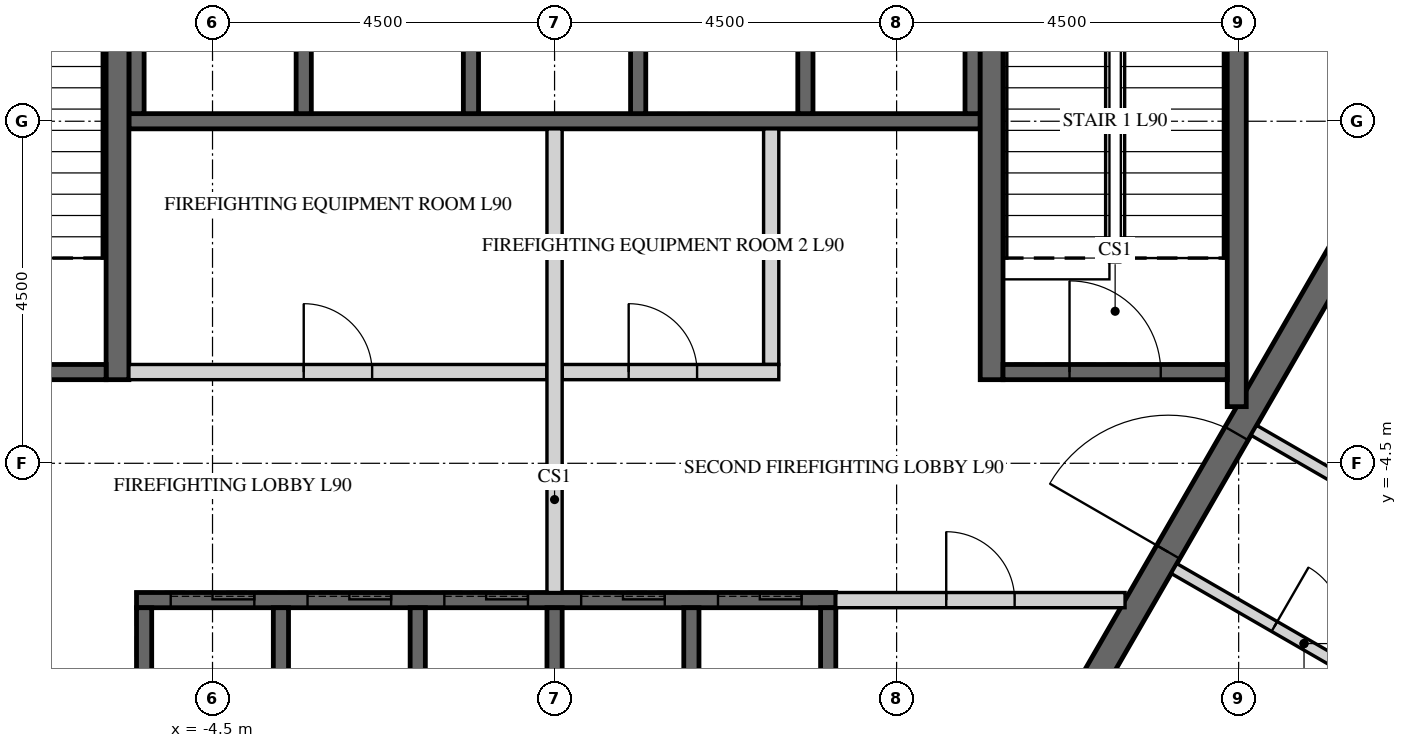
"""IFC4 building model, lengths in metres.
Left out: names, types, materials, properties, quantities, classifications, styles, units other than length and angle.
Written with IfcOpenShell. Run it as: python <this file> out.ifc"""

import sys

from ifc_helpers import new_model, si_unit, direction, frame, frame_2d, origin, place, context, subcontext, project, spatial, polyline, rectangle, outline, extrude, element, fill, save


model = new_model("IFC4")
c1 = context("Model", 3, precision=1e-05, world=origin(), true_north=direction((0.0, 1.0)))
c2 = subcontext(c1, "Body", "Model", "MODEL_VIEW")
j1 = project(units=[si_unit("LENGTHUNIT", "METRE"), si_unit("PLANEANGLEUNIT", "RADIAN")], contexts=[c1])
p1 = place(None, origin())
s1 = spatial("IfcSite", under=j1, at=p1, CompositionType="ELEMENT")
p2 = place(p1, origin())
s2 = spatial("IfcBuilding", under=s1, at=p2, CompositionType="ELEMENT")
p3 = place(p2, frame((0.0, 0.0, 372.9)))
s3 = spatial("IfcBuildingStorey", under=s2, at=p3, CompositionType="ELEMENT", Elevation=372.9)
p4 = place(p3, frame((-5.673, 9.825, -0.15), z_axis=(0.0, 0.0, 1.0), x_axis=(-0.499995046907, -0.866028263435, 0.0)))
e1 = element("IfcWall", 1, at=p4, inside=s3, PredefinedType="SHEAR", context=c2, shape_type="SweptSolid", body=[
    extrude(outline(polyline([(-0.101, -0.175), (11.446, -0.175), (11.244, 0.175), (0.101, 0.175), (-0.101, -0.175)])), origin(), (0.0, 0.0, 1.0), 3.55),
])
p5 = place(p4, frame((4.801, 0.0, 0.15)))
e2 = element("IfcOpeningElement", 2, at=p5, cuts=e1, PredefinedType="OPENING", context=c2, shape_type="SweptSolid", body=[
    extrude(rectangle(XDim=1.8, YDim=2.4, at=frame_2d((0.9, 1.2))), frame((0.0, 0.185, 0.0), z_axis=(0.0, -1.0, 0.0), x_axis=(1.0, 0.0, 0.0)), (0.0, 0.0, 1.0), 0.37),
])
p6 = place(p3, frame((-11.345, 0.0, -0.15), z_axis=(0.0, 0.0, 1.0), x_axis=(0.499995046907, -0.866028263435, 0.0)))
e3 = element("IfcWall", 3, at=p6, inside=s3, PredefinedType="SHEAR", context=c2, shape_type="SweptSolid", body=[
    extrude(outline(polyline([(-0.101, -0.175), (11.446, -0.175), (11.244, 0.175), (0.101, 0.175), (-0.101, -0.175)])), origin(), (0.0, 0.0, 1.0), 3.55),
])
p7 = place(p6, frame((4.744, 0.0, 0.15)))
e4 = element("IfcOpeningElement", 4, at=p7, cuts=e3, PredefinedType="OPENING", context=c2, shape_type="SweptSolid", body=[
    extrude(rectangle(XDim=1.8, YDim=2.4, at=frame_2d((0.9, 1.2))), frame((0.0, 0.185, 0.0), z_axis=(0.0, -1.0, 0.0), x_axis=(1.0, 0.0, 0.0)), (0.0, 0.0, 1.0), 0.37),
])
p8 = place(p3, frame((5.673, -9.825, -0.15), z_axis=(0.0, 0.0, 1.0), x_axis=(0.499995046907, 0.866028263435, 0.0)))
e5 = element("IfcWall", 5, at=p8, inside=s3, PredefinedType="SHEAR", context=c2, shape_type="SweptSolid", body=[
    extrude(outline(polyline([(-0.101, -0.175), (11.446, -0.175), (11.244, 0.175), (0.101, 0.175), (-0.101, -0.175)])), origin(), (0.0, 0.0, 1.0), 3.55),
])
p9 = place(p8, frame((4.801, 0.0, 0.15)))
e6 = element("IfcOpeningElement", 6, at=p9, cuts=e5, PredefinedType="OPENING", context=c2, shape_type="SweptSolid", body=[
    extrude(rectangle(XDim=1.8, YDim=2.4, at=frame_2d((0.9, 1.2))), frame((0.0, 0.185, 0.0), z_axis=(0.0, -1.0, 0.0), x_axis=(1.0, 0.0, 0.0)), (0.0, 0.0, 1.0), 0.37),
])
p10 = place(p3, frame((11.345, 0.0, -0.15), z_axis=(0.0, 0.0, 1.0), x_axis=(-0.499995046907, 0.866028263435, 0.0)))
e7 = element("IfcWall", 7, at=p10, inside=s3, PredefinedType="SHEAR", context=c2, shape_type="SweptSolid", body=[
    extrude(outline(polyline([(-0.101, -0.175), (11.446, -0.175), (11.244, 0.175), (0.101, 0.175), (-0.101, -0.175)])), origin(), (0.0, 0.0, 1.0), 3.55),
])
p11 = place(p10, frame((4.744, 0.0, 0.15)))
e8 = element("IfcOpeningElement", 8, at=p11, cuts=e7, PredefinedType="OPENING", context=c2, shape_type="SweptSolid", body=[
    extrude(rectangle(XDim=1.8, YDim=2.4, at=frame_2d((0.9, 1.2))), frame((0.0, 0.185, 0.0), z_axis=(0.0, -1.0, 0.0), x_axis=(1.0, 0.0, 0.0)), (0.0, 0.0, 1.0), 0.37),
])
p12 = place(p3, frame((-5.6, 0.0, -0.25), z_axis=(0.0, 0.0, 1.0), x_axis=(1.0, 0.0, 0.0)))
e9 = element("IfcWall", 9, at=p12, inside=s3, PredefinedType="SHEAR", context=c2, shape_type="SweptSolid", body=[
    extrude(rectangle(XDim=11.2, YDim=0.2, at=frame_2d((5.6, 0.0))), origin(), (0.0, 0.0, 1.0), 3.9),
])
for number, where, z_axis, x_axis in (
    (10, (-5.5, 0.1, -0.25), (0.0, 0.0, 1.0), (0.0, 1.0, 0.0)),
    (11, (-3.3, 0.1, -0.25), (0.0, 0.0, 1.0), (0.0, 1.0, 0.0)),
    (12, (-1.1, 0.1, -0.25), (0.0, 0.0, 1.0), (0.0, 1.0, 0.0)),
):
    element("IfcWall", number, at=place(p3, frame(where, z_axis=z_axis, x_axis=x_axis)), inside=s3, PredefinedType="SHEAR", context=c2, shape_type="SweptSolid", body=[
        extrude(rectangle(XDim=3.1, YDim=0.2, at=frame_2d((1.55, 0.0))), origin(), (0.0, 0.0, 1.0), 3.9),
    ])
for number, where, z_axis, x_axis in (
    (13, (1.1, 0.1, -0.25), (0.0, 0.0, 1.0), (0.0, 1.0, 0.0)),
    (14, (3.3, 0.1, -0.25), (0.0, 0.0, 1.0), (0.0, 1.0, 0.0)),
):
    element("IfcWall", number, at=place(p3, frame(where, z_axis=z_axis, x_axis=x_axis)), inside=s3, PredefinedType="SHEAR", context=c2, shape_type="SweptSolid", body=[
        extrude(rectangle(XDim=3.3, YDim=0.2, at=frame_2d((1.65, 0.0))), origin(), (0.0, 0.0, 1.0), 3.9),
    ])
p13 = place(p3, frame((5.5, 0.1, -0.25), z_axis=(0.0, 0.0, 1.0), x_axis=(0.0, 1.0, 0.0)))
e15 = element("IfcWall", 15, at=p13, inside=s3, PredefinedType="SHEAR", context=c2, shape_type="SweptSolid", body=[
    extrude(rectangle(XDim=3.1, YDim=0.2, at=frame_2d((1.55, 0.0))), origin(), (0.0, 0.0, 1.0), 3.9),
])
p14 = place(p3, frame((-5.5, -6.3, -0.25), z_axis=(0.0, 0.0, 1.0), x_axis=(1.0, 0.0, 0.0)))
e16 = element("IfcWall", 16, at=p14, inside=s3, PredefinedType="SHEAR", context=c2, shape_type="SweptSolid", body=[
    extrude(rectangle(XDim=9.2, YDim=0.2, at=frame_2d((4.6, 0.0))), origin(), (0.0, 0.0, 1.0), 3.9),
])
p15 = place(p14, frame((0.45, 0.0, 0.25)))
e17 = element("IfcOpeningElement", 17, at=p15, cuts=e16, PredefinedType="OPENING", context=c2, shape_type="SweptSolid", body=[
    extrude(rectangle(XDim=1.1, YDim=2.1, at=frame_2d((0.55, 1.05))), frame((0.0, 0.11, 0.0), z_axis=(0.0, -1.0, 0.0), x_axis=(1.0, 0.0, 0.0)), (0.0, 0.0, 1.0), 0.22),
])
p16 = place(p14, frame((2.25, 0.0, 0.25)))
e18 = element("IfcOpeningElement", 18, at=p16, cuts=e16, PredefinedType="OPENING", context=c2, shape_type="SweptSolid", body=[
    extrude(rectangle(XDim=1.1, YDim=2.1, at=frame_2d((0.55, 1.05))), frame((0.0, 0.11, 0.0), z_axis=(0.0, -1.0, 0.0), x_axis=(1.0, 0.0, 0.0)), (0.0, 0.0, 1.0), 0.22),
])
p17 = place(p14, frame((4.05, 0.0, 0.25)))
e19 = element("IfcOpeningElement", 19, at=p17, cuts=e16, PredefinedType="OPENING", context=c2, shape_type="SweptSolid", body=[
    extrude(rectangle(XDim=1.1, YDim=2.1, at=frame_2d((0.55, 1.05))), frame((0.0, 0.11, 0.0), z_axis=(0.0, -1.0, 0.0), x_axis=(1.0, 0.0, 0.0)), (0.0, 0.0, 1.0), 0.22),
])
p18 = place(p14, frame((5.85, 0.0, 0.25)))
e20 = element("IfcOpeningElement", 20, at=p18, cuts=e16, PredefinedType="OPENING", context=c2, shape_type="SweptSolid", body=[
    extrude(rectangle(XDim=1.1, YDim=2.1, at=frame_2d((0.55, 1.05))), frame((0.0, 0.11, 0.0), z_axis=(0.0, -1.0, 0.0), x_axis=(1.0, 0.0, 0.0)), (0.0, 0.0, 1.0), 0.22),
])
p19 = place(p14, frame((7.65, 0.0, 0.25)))
e21 = element("IfcOpeningElement", 21, at=p19, cuts=e16, PredefinedType="OPENING", context=c2, shape_type="SweptSolid", body=[
    extrude(rectangle(XDim=1.1, YDim=2.1, at=frame_2d((0.55, 1.05))), frame((0.0, 0.11, 0.0), z_axis=(0.0, -1.0, 0.0), x_axis=(1.0, 0.0, 0.0)), (0.0, 0.0, 1.0), 0.22),
])
for number, where, z_axis, x_axis in (
    (22, (-5.4, -9.3, -0.25), (0.0, 0.0, 1.0), (0.0, 1.0, 0.0)),
    (23, (-3.6, -9.3, -0.25), (0.0, 0.0, 1.0), (0.0, 1.0, 0.0)),
    (24, (-1.8, -9.3, -0.25), (0.0, 0.0, 1.0), (0.0, 1.0, 0.0)),
    (25, (0.0, -9.3, -0.25), (0.0, 0.0, 1.0), (0.0, 1.0, 0.0)),
    (26, (1.8, -9.3, -0.25), (0.0, 0.0, 1.0), (0.0, 1.0, 0.0)),
    (27, (3.6, -9.3, -0.25), (0.0, 0.0, 1.0), (0.0, 1.0, 0.0)),
):
    element("IfcWall", number, at=place(p3, frame(where, z_axis=z_axis, x_axis=x_axis)), inside=s3, PredefinedType="SHEAR", context=c2, shape_type="SweptSolid", body=[
        extrude(rectangle(XDim=2.9, YDim=0.2, at=frame_2d((1.45, 0.0))), origin(), (0.0, 0.0, 1.0), 3.9),
    ])
p20 = place(p3, frame((-5.6, -3.3, 0.0), z_axis=(0.0, 0.0, 1.0), x_axis=(1.0, 0.0, 0.0)))
e28 = element("IfcWall", 28, at=p20, inside=s3, PredefinedType="PARTITIONING", context=c2, shape_type="SweptSolid", body=[
    extrude(rectangle(XDim=5.5, YDim=0.2, at=frame_2d((2.75, 0.0))), origin(), (0.0, 0.0, 1.0), 3.65),
])
p21 = place(p20, frame((2.3, 0.0, 0.0)))
e29 = element("IfcOpeningElement", 29, at=p21, cuts=e28, PredefinedType="OPENING", context=c2, shape_type="SweptSolid", body=[
    extrude(rectangle(XDim=0.9, YDim=2.1, at=frame_2d((0.45, 1.05))), frame((0.0, 0.11, 0.0), z_axis=(0.0, -1.0, 0.0), x_axis=(1.0, 0.0, 0.0)), (0.0, 0.0, 1.0), 0.22),
])
p22 = place(p3, frame((0.1, -3.3, 0.0), z_axis=(0.0, 0.0, 1.0), x_axis=(1.0, 0.0, 0.0)))
e30 = element("IfcWall", 30, at=p22, inside=s3, PredefinedType="PARTITIONING", context=c2, shape_type="SweptSolid", body=[
    extrude(rectangle(XDim=2.85, YDim=0.2, at=frame_2d((1.425, 0.0))), origin(), (0.0, 0.0, 1.0), 3.65),
])
p23 = place(p22, frame((0.875, 0.0, 0.0)))
e31 = element("IfcOpeningElement", 31, at=p23, cuts=e30, PredefinedType="OPENING", context=c2, shape_type="SweptSolid", body=[
    extrude(rectangle(XDim=0.9, YDim=2.1, at=frame_2d((0.45, 1.05))), frame((0.0, 0.11, 0.0), z_axis=(0.0, -1.0, 0.0), x_axis=(1.0, 0.0, 0.0)), (0.0, 0.0, 1.0), 0.22),
])
p24 = place(p3, frame((2.85, -3.2, 0.0), z_axis=(0.0, 0.0, 1.0), x_axis=(0.0, 1.0, 0.0)))
e32 = element("IfcWall", 32, at=p24, inside=s3, PredefinedType="PARTITIONING", context=c2, shape_type="SweptSolid", body=[
    extrude(rectangle(XDim=3.1, YDim=0.2, at=frame_2d((1.55, 0.0))), origin(), (0.0, 0.0, 1.0), 3.65),
])
p25 = place(p3, frame((0.0, -6.2, 0.0), z_axis=(0.0, 0.0, 1.0), x_axis=(0.0, 1.0, 0.0)))
e33 = element("IfcWall", 33, at=p25, inside=s3, PredefinedType="PARTITIONING", context=c2, shape_type="SweptSolid", body=[
    extrude(rectangle(XDim=6.1, YDim=0.2, at=frame_2d((3.05, 0.0))), origin(), (0.0, 0.0, 1.0), 3.65),
])
p26 = place(p3, frame((3.7, -6.3, 0.0), z_axis=(0.0, 0.0, 1.0), x_axis=(1.0, 0.0, 0.0)))
e34 = element("IfcWall", 34, at=p26, inside=s3, PredefinedType="PARTITIONING", context=c2, shape_type="SweptSolid", body=[
    extrude(rectangle(XDim=3.806, YDim=0.2, at=frame_2d((1.903, 0.0))), origin(), (0.0, 0.0, 1.0), 3.65),
])
p27 = place(p26, frame((1.453, 0.0, 0.0)))
e35 = element("IfcOpeningElement", 35, at=p27, cuts=e34, PredefinedType="OPENING", context=c2, shape_type="SweptSolid", body=[
    extrude(rectangle(XDim=0.9, YDim=2.1, at=frame_2d((0.45, 1.05))), frame((0.0, 0.11, 0.0), z_axis=(0.0, -1.0, 0.0), x_axis=(1.0, 0.0, 0.0)), (0.0, 0.0, 1.0), 0.22),
])
p28 = place(p3, frame((5.75, -3.4, -0.25), z_axis=(0.0, 0.0, 1.0), x_axis=(0.0, 1.0, 0.0)))
e36 = element("IfcWall", 36, at=p28, inside=s3, PredefinedType="SHEAR", context=c2, shape_type="SweptSolid", body=[
    extrude(rectangle(XDim=6.8, YDim=0.3, at=frame_2d((3.4, 0.0))), origin(), (0.0, 0.0, 1.0), 3.9),
])
p29 = place(p3, frame((8.975, -3.755, -0.25), z_axis=(0.0, 0.0, 1.0), x_axis=(0.0, 1.0, 0.0)))
e37 = element("IfcWall", 37, at=p29, inside=s3, PredefinedType="SHEAR", context=c2, shape_type="SweptSolid", body=[
    extrude(rectangle(XDim=7.51, YDim=0.25, at=frame_2d((3.755, 0.0))), origin(), (0.0, 0.0, 1.0), 3.9),
])
p30 = place(p3, frame((5.9, -3.3, -0.25), z_axis=(0.0, 0.0, 1.0), x_axis=(1.0, 0.0, 0.0)))
e38 = element("IfcWall", 38, at=p30, inside=s3, PredefinedType="SHEAR", context=c2, shape_type="SweptSolid", body=[
    extrude(rectangle(XDim=2.95, YDim=0.2, at=frame_2d((1.475, 0.0))), origin(), (0.0, 0.0, 1.0), 3.9),
])
p31 = place(p30, frame((0.875, 0.0, 0.25)))
e39 = element("IfcOpeningElement", 39, at=p31, cuts=e38, PredefinedType="OPENING", context=c2, shape_type="SweptSolid", body=[
    extrude(rectangle(XDim=1.2, YDim=2.4, at=frame_2d((0.6, 1.2))), frame((0.0, 0.11, 0.0), z_axis=(0.0, -1.0, 0.0), x_axis=(1.0, 0.0, 0.0)), (0.0, 0.0, 1.0), 0.22),
])
p32 = place(p3, frame((-5.75, -3.4, -0.25), z_axis=(0.0, 0.0, 1.0), x_axis=(0.0, 1.0, 0.0)))
e40 = element("IfcWall", 40, at=p32, inside=s3, PredefinedType="SHEAR", context=c2, shape_type="SweptSolid", body=[
    extrude(rectangle(XDim=6.8, YDim=0.3, at=frame_2d((3.4, 0.0))), origin(), (0.0, 0.0, 1.0), 3.9),
])
p33 = place(p3, frame((-8.85, -3.3, -0.25), z_axis=(0.0, 0.0, 1.0), x_axis=(1.0, 0.0, 0.0)))
e41 = element("IfcWall", 41, at=p33, inside=s3, PredefinedType="SHEAR", context=c2, shape_type="SweptSolid", body=[
    extrude(rectangle(XDim=2.95, YDim=0.2, at=frame_2d((1.475, 0.0))), origin(), (0.0, 0.0, 1.0), 3.9),
])
p34 = place(p33, frame((0.875, 0.0, 0.25)))
e42 = element("IfcOpeningElement", 42, at=p34, cuts=e41, PredefinedType="OPENING", context=c2, shape_type="SweptSolid", body=[
    extrude(rectangle(XDim=1.2, YDim=2.4, at=frame_2d((0.6, 1.2))), frame((0.0, 0.11, 0.0), z_axis=(0.0, -1.0, 0.0), x_axis=(1.0, 0.0, 0.0)), (0.0, 0.0, 1.0), 0.22),
])
p35 = place(p3, frame((17.401, -1.21, 0.0), z_axis=(0.0, 0.0, 1.0), x_axis=(-0.559186729505, 0.829041736914, 0.0)))
e43 = element("IfcWall", 43, at=p35, inside=s3, PredefinedType="PARTITIONING", context=c2, shape_type="SweptSolid", body=[
    extrude(rectangle(XDim=15.243, YDim=0.15, at=frame_2d((7.621, 0.0))), origin(), (0.0, 0.0, 1.0), 2.47),
])
p36 = place(p35, frame((5.802, 0.0, 0.0)))
e44 = element("IfcOpeningElement", 44, at=p36, cuts=e43, PredefinedType="OPENING", context=c2, shape_type="SweptSolid", body=[
    extrude(rectangle(XDim=1.0, YDim=2.1, at=frame_2d((0.5, 1.05))), frame((0.0, 0.085, 0.0), z_axis=(0.0, -1.0, 0.0), x_axis=(1.0, 0.0, 0.0)), (0.0, 0.0, 1.0), 0.17),
])
p37 = place(p3, frame((12.555, -6.003, 0.0), z_axis=(0.0, 0.0, 1.0), x_axis=(-0.866016658288, 0.500015147339, 0.0)))
e45 = element("IfcWall", 45, at=p37, inside=s3, PredefinedType="PARTITIONING", context=c2, shape_type="SweptSolid", body=[
    extrude(rectangle(XDim=3.875, YDim=0.15, at=frame_2d((1.938, 0.0))), origin(), (0.0, 0.0, 1.0), 2.47),
])
p38 = place(p3, frame((8.15, -5.884, 0.0), z_axis=(0.0, 0.0, 1.0), x_axis=(0.866020906874, -0.500007788796, 0.0)))
e46 = element("IfcWall", 46, at=p38, inside=s3, PredefinedType="PARTITIONING", context=c2, shape_type="SweptSolid", body=[
    extrude(rectangle(XDim=3.95, YDim=0.15, at=frame_2d((1.975, 0.0))), origin(), (0.0, 0.0, 1.0), 2.47),
])
p39 = place(p38, frame((1.525, 0.0, 0.0)))
e47 = element("IfcOpeningElement", 47, at=p39, cuts=e46, PredefinedType="OPENING", context=c2, shape_type="SweptSolid", body=[
    extrude(rectangle(XDim=0.9, YDim=2.1, at=frame_2d((0.45, 1.05))), frame((0.0, 0.085, 0.0), z_axis=(0.0, -1.0, 0.0), x_axis=(1.0, 0.0, 0.0)), (0.0, 0.0, 1.0), 0.17),
])
p40 = place(p9, origin())
e48 = element("IfcDoor", 48, at=p40, inside=s3, OperationType="DOUBLE_DOOR_SINGLE_SWING", PredefinedType="DOOR", context=c2, shape_type="SweptSolid", body=[
    extrude(rectangle(XDim=1.8, YDim=2.4, at=frame_2d((0.9, 1.2))), frame((0.0, 0.025, 0.0), z_axis=(0.0, -1.0, 0.0), x_axis=(1.0, 0.0, 0.0)), (0.0, 0.0, 1.0), 0.05),
])
fill(e6, e48)
p41 = place(p21, origin())
e49 = element("IfcDoor", 49, at=p41, inside=s3, OperationType="SINGLE_SWING_LEFT", PredefinedType="DOOR", context=c2, shape_type="SweptSolid", body=[
    extrude(rectangle(XDim=0.9, YDim=2.1, at=frame_2d((0.45, 1.05))), frame((0.0, 0.025, 0.0), z_axis=(0.0, -1.0, 0.0), x_axis=(1.0, 0.0, 0.0)), (0.0, 0.0, 1.0), 0.05),
])
fill(e29, e49)
p42 = place(p23, origin())
e50 = element("IfcDoor", 50, at=p42, inside=s3, OperationType="SINGLE_SWING_LEFT", PredefinedType="DOOR", context=c2, shape_type="SweptSolid", body=[
    extrude(rectangle(XDim=0.9, YDim=2.1, at=frame_2d((0.45, 1.05))), frame((0.0, 0.025, 0.0), z_axis=(0.0, -1.0, 0.0), x_axis=(1.0, 0.0, 0.0)), (0.0, 0.0, 1.0), 0.05),
])
fill(e31, e50)
p43 = place(p27, origin())
e51 = element("IfcDoor", 51, at=p43, inside=s3, OperationType="SINGLE_SWING_LEFT", PredefinedType="DOOR", context=c2, shape_type="SweptSolid", body=[
    extrude(rectangle(XDim=0.9, YDim=2.1, at=frame_2d((0.45, 1.05))), frame((0.0, 0.025, 0.0), z_axis=(0.0, -1.0, 0.0), x_axis=(1.0, 0.0, 0.0)), (0.0, 0.0, 1.0), 0.05),
])
fill(e35, e51)
p44 = place(p31, origin())
e52 = element("IfcDoor", 52, at=p44, inside=s3, OperationType="SINGLE_SWING_LEFT", PredefinedType="DOOR", context=c2, shape_type="SweptSolid", body=[
    extrude(rectangle(XDim=1.2, YDim=2.4, at=frame_2d((0.6, 1.2))), frame((0.0, 0.025, 0.0), z_axis=(0.0, -1.0, 0.0), x_axis=(1.0, 0.0, 0.0)), (0.0, 0.0, 1.0), 0.05),
])
fill(e39, e52)
p45 = place(p15, origin())
e53 = element("IfcDoor", 53, at=p45, inside=s3, OperationType="SLIDING_TO_LEFT", PredefinedType="DOOR", context=c2, shape_type="SweptSolid", body=[
    extrude(rectangle(XDim=1.1, YDim=2.1, at=frame_2d((0.55, 1.05))), frame((0.0, 0.025, 0.0), z_axis=(0.0, -1.0, 0.0), x_axis=(1.0, 0.0, 0.0)), (0.0, 0.0, 1.0), 0.05),
])
fill(e17, e53)
p46 = place(p16, origin())
e54 = element("IfcDoor", 54, at=p46, inside=s3, OperationType="SLIDING_TO_LEFT", PredefinedType="DOOR", context=c2, shape_type="SweptSolid", body=[
    extrude(rectangle(XDim=1.1, YDim=2.1, at=frame_2d((0.55, 1.05))), frame((0.0, 0.025, 0.0), z_axis=(0.0, -1.0, 0.0), x_axis=(1.0, 0.0, 0.0)), (0.0, 0.0, 1.0), 0.05),
])
fill(e18, e54)
p47 = place(p17, origin())
e55 = element("IfcDoor", 55, at=p47, inside=s3, OperationType="SLIDING_TO_LEFT", PredefinedType="DOOR", context=c2, shape_type="SweptSolid", body=[
    extrude(rectangle(XDim=1.1, YDim=2.1, at=frame_2d((0.55, 1.05))), frame((0.0, 0.025, 0.0), z_axis=(0.0, -1.0, 0.0), x_axis=(1.0, 0.0, 0.0)), (0.0, 0.0, 1.0), 0.05),
])
fill(e19, e55)
p48 = place(p18, origin())
e56 = element("IfcDoor", 56, at=p48, inside=s3, OperationType="SLIDING_TO_LEFT", PredefinedType="DOOR", context=c2, shape_type="SweptSolid", body=[
    extrude(rectangle(XDim=1.1, YDim=2.1, at=frame_2d((0.55, 1.05))), frame((0.0, 0.025, 0.0), z_axis=(0.0, -1.0, 0.0), x_axis=(1.0, 0.0, 0.0)), (0.0, 0.0, 1.0), 0.05),
])
fill(e20, e56)
p49 = place(p19, origin())
e57 = element("IfcDoor", 57, at=p49, inside=s3, OperationType="SLIDING_TO_LEFT", PredefinedType="DOOR", context=c2, shape_type="SweptSolid", body=[
    extrude(rectangle(XDim=1.1, YDim=2.1, at=frame_2d((0.55, 1.05))), frame((0.0, 0.025, 0.0), z_axis=(0.0, -1.0, 0.0), x_axis=(1.0, 0.0, 0.0)), (0.0, 0.0, 1.0), 0.05),
])
fill(e21, e57)
p50 = place(p39, origin())
e58 = element("IfcDoor", 58, at=p50, inside=s3, OperationType="SINGLE_SWING_LEFT", PredefinedType="DOOR", context=c2, shape_type="SweptSolid", body=[
    extrude(rectangle(XDim=0.9, YDim=2.1, at=frame_2d((0.45, 1.05))), frame((0.0, 0.025, 0.0), z_axis=(0.0, -1.0, 0.0), x_axis=(1.0, 0.0, 0.0)), (0.0, 0.0, 1.0), 0.05),
])
fill(e47, e58)
save(model, sys.argv[1])
